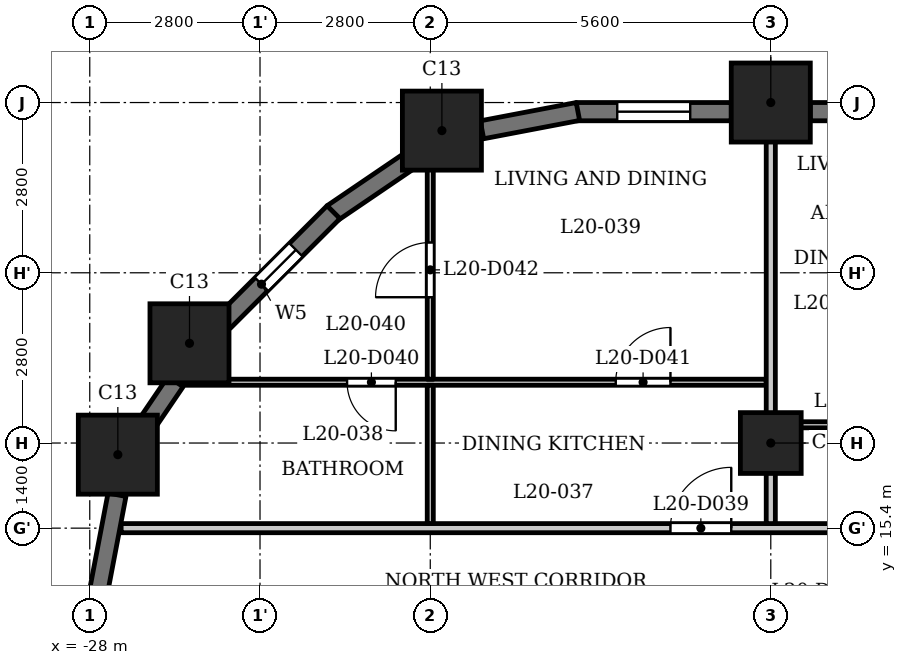
"""IFC4 building model, lengths in metres.
Left out: names, types, materials, properties, quantities, classifications, styles, units other than length and angle.
Written with IfcOpenShell. Run it as: python <this file> out.ifc"""

import sys

from ifc_helpers import new_model, si_unit, direction, frame, frame_2d, origin, origin_2d, place, context, subcontext, project, spatial, rectangle, extrude, element, fill, save


model = new_model("IFC4")
c1 = context("Model", 3, precision=1e-05, world=origin(), true_north=direction((0.0, 1.0)))
c2 = subcontext(c1, "Body", "Model", "MODEL_VIEW")
j1 = project(units=[si_unit("LENGTHUNIT", "METRE"), si_unit("PLANEANGLEUNIT", "RADIAN")], contexts=[c1])
p1 = place(None, origin())
s1 = spatial("IfcSite", under=j1, at=p1, CompositionType="ELEMENT")
p2 = place(p1, origin())
s2 = spatial("IfcBuilding", under=s1, at=p2, CompositionType="ELEMENT")
p3 = place(p2, frame((0.0, 0.0, 83.3)))
s3 = spatial("IfcBuildingStorey", under=s2, at=p3, CompositionType="ELEMENT", Elevation=83.3)
for number, where, z_axis, x_axis in (
    (1, (-16.8, 22.4, 0.0), (0.0, 0.0, 1.0), (1.0, 0.0, 0.0)),
    (2, (-22.209, 21.938, 0.0), (0.0, 0.0, 1.0), (1.0, 0.0, 0.0)),
    (3, (-26.36, 18.44, 0.0), (0.0, 0.0, 1.0), (1.0, 0.0, 0.0)),
    (4, (-27.538, 16.609, 0.0), (0.0, 0.0, 1.0), (1.0, 0.0, 0.0)),
):
    element("IfcColumn", number, at=place(p3, frame(where, z_axis=z_axis, x_axis=x_axis)), inside=s3, PredefinedType="COLUMN", context=c2, shape_type="SweptSolid", body=[
        extrude(rectangle(XDim=1.3, YDim=1.3, at=origin_2d()), origin(), (0.0, 0.0, 1.0), 3.5),
    ])
p4 = place(p3, frame((-16.8, 16.8, 0.0), z_axis=(0.0, 0.0, 1.0), x_axis=(1.0, 0.0, 0.0)))
e5 = element("IfcColumn", 5, at=p4, inside=s3, PredefinedType="COLUMN", context=c2, shape_type="SweptSolid", body=[
    extrude(rectangle(XDim=1.0, YDim=1.0, at=origin_2d()), origin(), (0.0, 0.0, 1.0), 3.5),
])
p5 = place(p3, frame((-11.85, 22.25, 0.0), z_axis=(0.0, 0.0, 1.0), x_axis=(-1.0, 0.0, 0.0)))
e6 = element("IfcWall", 6, at=p5, inside=s3, PredefinedType="SOLIDWALL", context=c2, shape_type="SweptSolid", body=[
    extrude(rectangle(XDim=4.3, YDim=0.3, at=frame_2d((2.15, 0.0))), origin(), (0.0, 0.0, 1.0), 2.4),
])
p6 = place(p5, frame((0.538, 0.0, 0.6)))
e7 = element("IfcOpeningElement", 7, at=p6, cuts=e6, PredefinedType="OPENING", context=c2, shape_type="SweptSolid", body=[
    extrude(rectangle(XDim=1.2, YDim=1.55, at=frame_2d((0.6, 0.775))), frame((0.0, 0.16, 0.0), z_axis=(0.0, -1.0, 0.0), x_axis=(1.0, 0.0, 0.0)), (0.0, 0.0, 1.0), 0.32),
])
p7 = place(p5, frame((2.762, 0.0, 0.6)))
e8 = element("IfcOpeningElement", 8, at=p7, cuts=e6, PredefinedType="OPENING", context=c2, shape_type="SweptSolid", body=[
    extrude(rectangle(XDim=1.2, YDim=1.55, at=frame_2d((0.6, 0.775))), frame((0.0, 0.16, 0.0), z_axis=(0.0, -1.0, 0.0), x_axis=(1.0, 0.0, 0.0)), (0.0, 0.0, 1.0), 0.32),
])
p8 = place(p3, frame((-17.45, 22.25, 0.0), z_axis=(0.0, 0.0, 1.0), x_axis=(-1.0, 0.0, 0.0)))
e9 = element("IfcWall", 9, at=p8, inside=s3, PredefinedType="SOLIDWALL", context=c2, shape_type="SweptSolid", body=[
    extrude(rectangle(XDim=2.55, YDim=0.3, at=frame_2d((1.275, 0.0))), origin(), (0.0, 0.0, 1.0), 2.4),
])
p9 = place(p8, frame((0.675, 0.0, 0.6)))
e10 = element("IfcOpeningElement", 10, at=p9, cuts=e9, PredefinedType="OPENING", context=c2, shape_type="SweptSolid", body=[
    extrude(rectangle(XDim=1.2, YDim=1.55, at=frame_2d((0.6, 0.775))), frame((0.0, 0.16, 0.0), z_axis=(0.0, -1.0, 0.0), x_axis=(1.0, 0.0, 0.0)), (0.0, 0.0, 1.0), 0.32),
])
for number, where, z_axis, x_axis in (
    (11, (-19.972, 22.253, 0.0), (0.0, 0.0, 1.0), (-0.982, -0.187, 0.0)),
    (12, (-22.684, 21.482, 0.0), (0.0, 0.0, 1.0), (-0.827, -0.562, 0.0)),
):
    element("IfcWall", number, at=place(p3, frame(where, z_axis=z_axis, x_axis=x_axis)), inside=s3, PredefinedType="SOLIDWALL", context=c2, shape_type="SweptSolid", body=[
        extrude(rectangle(XDim=1.606, YDim=0.3, at=frame_2d((0.803, 0.0))), origin(), (0.0, 0.0, 1.0), 2.4),
    ])
p10 = place(p3, frame((-23.991, 20.597, 0.0), z_axis=(0.0, 0.0, 1.0), x_axis=(-0.707106781187, -0.707106781187, 0.0)))
e13 = element("IfcWall", 13, at=p10, inside=s3, PredefinedType="SOLIDWALL", context=c2, shape_type="SweptSolid", body=[
    extrude(rectangle(XDim=2.55, YDim=0.3, at=frame_2d((1.275, 0.0))), origin(), (0.0, 0.0, 1.0), 2.4),
])
p11 = place(p10, frame((0.875, 0.0, 0.6)))
e14 = element("IfcOpeningElement", 14, at=p11, cuts=e13, PredefinedType="OPENING", context=c2, shape_type="SweptSolid", body=[
    extrude(rectangle(XDim=0.8, YDim=1.55, at=frame_2d((0.4, 0.775))), frame((0.0, 0.16, 0.0), z_axis=(0.0, -1.0, 0.0), x_axis=(1.0, 0.0, 0.0)), (0.0, 0.0, 1.0), 0.32),
])
p12 = place(p3, frame((-26.589, 17.81, 0.0), z_axis=(0.0, 0.0, 1.0), x_axis=(-0.562066330934, -0.827092159091, 0.0)))
e15 = element("IfcWall", 15, at=p12, inside=s3, PredefinedType="SOLIDWALL", context=c2, shape_type="SweptSolid", body=[
    extrude(rectangle(XDim=0.877, YDim=0.3, at=frame_2d((0.438, 0.0))), origin(), (0.0, 0.0, 1.0), 3.2),
])
p13 = place(p3, frame((-27.552, 15.949, 0.0), z_axis=(0.0, 0.0, 1.0), x_axis=(-0.187279751651, -0.982306619453, 0.0)))
e16 = element("IfcWall", 16, at=p13, inside=s3, PredefinedType="SOLIDWALL", context=c2, shape_type="SweptSolid", body=[
    extrude(rectangle(XDim=1.606, YDim=0.3, at=frame_2d((0.803, 0.0))), origin(), (0.0, 0.0, 1.0), 2.4),
])
p14 = place(p3, frame((-27.484, 15.4, 0.0), z_axis=(0.0, 0.0, 1.0), x_axis=(1.0, 0.0, 0.0)))
e17 = element("IfcWall", 17, at=p14, inside=s3, PredefinedType="PARTITIONING", context=c2, shape_type="SweptSolid", body=[
    extrude(rectangle(XDim=12.559, YDim=0.15, at=frame_2d((6.279, 0.0))), origin(), (0.0, 0.0, 1.0), 3.2),
])
p15 = place(p14, frame((9.034, 0.0, 0.0)))
e18 = element("IfcOpeningElement", 18, at=p15, cuts=e17, PredefinedType="OPENING", context=c2, shape_type="SweptSolid", body=[
    extrude(rectangle(XDim=1.0, YDim=2.1, at=frame_2d((0.5, 1.05))), frame((0.0, 0.085, 0.0), z_axis=(0.0, -1.0, 0.0), x_axis=(1.0, 0.0, 0.0)), (0.0, 0.0, 1.0), 0.17),
])
p16 = place(p3, frame((-16.725, 17.1, 0.0), z_axis=(0.0, 0.0, 1.0), x_axis=(1.0, 0.0, 0.0)))
e19 = element("IfcWall", 19, at=p16, inside=s3, PredefinedType="PARTITIONING", context=c2, shape_type="SweptSolid", body=[
    extrude(rectangle(XDim=33.45, YDim=0.1, at=frame_2d((16.725, 0.0))), origin(), (0.0, 0.0, 1.0), 3.2),
])
p17 = place(p16, frame((3.925, 0.0, 0.0)))
e20 = element("IfcOpeningElement", 20, at=p17, cuts=e19, PredefinedType="OPENING", context=c2, shape_type="SweptSolid", body=[
    extrude(rectangle(XDim=0.8, YDim=2.1, at=frame_2d((0.4, 1.05))), frame((0.0, 0.06, 0.0), z_axis=(0.0, -1.0, 0.0), x_axis=(1.0, 0.0, 0.0)), (0.0, 0.0, 1.0), 0.12),
])
p18 = place(p16, frame((0.975, 0.0, 0.0)))
e21 = element("IfcOpeningElement", 21, at=p18, cuts=e19, PredefinedType="OPENING", context=c2, shape_type="SweptSolid", body=[
    extrude(rectangle(XDim=0.9, YDim=2.1, at=frame_2d((0.45, 1.05))), frame((0.0, 0.06, 0.0), z_axis=(0.0, -1.0, 0.0), x_axis=(1.0, 0.0, 0.0)), (0.0, 0.0, 1.0), 0.12),
])
p19 = place(p16, frame((6.425, 0.0, 0.0)))
e22 = element("IfcOpeningElement", 22, at=p19, cuts=e19, PredefinedType="OPENING", context=c2, shape_type="SweptSolid", body=[
    extrude(rectangle(XDim=0.8, YDim=2.1, at=frame_2d((0.4, 1.05))), frame((0.0, 0.06, 0.0), z_axis=(0.0, -1.0, 0.0), x_axis=(1.0, 0.0, 0.0)), (0.0, 0.0, 1.0), 0.12),
])
p20 = place(p16, frame((8.825, 0.0, 0.0)))
e23 = element("IfcOpeningElement", 23, at=p20, cuts=e19, PredefinedType="OPENING", context=c2, shape_type="SweptSolid", body=[
    extrude(rectangle(XDim=0.9, YDim=2.1, at=frame_2d((0.45, 1.05))), frame((0.0, 0.06, 0.0), z_axis=(0.0, -1.0, 0.0), x_axis=(1.0, 0.0, 0.0)), (0.0, 0.0, 1.0), 0.12),
])
p21 = place(p16, frame((12.375, 0.0, 0.0)))
e24 = element("IfcOpeningElement", 24, at=p21, cuts=e19, PredefinedType="OPENING", context=c2, shape_type="SweptSolid", body=[
    extrude(rectangle(XDim=0.9, YDim=2.1, at=frame_2d((0.45, 1.05))), frame((0.0, 0.06, 0.0), z_axis=(0.0, -1.0, 0.0), x_axis=(1.0, 0.0, 0.0)), (0.0, 0.0, 1.0), 0.12),
])
p22 = place(p16, frame((14.425, 0.0, 0.0)))
e25 = element("IfcOpeningElement", 25, at=p22, cuts=e19, PredefinedType="OPENING", context=c2, shape_type="SweptSolid", body=[
    extrude(rectangle(XDim=0.9, YDim=2.1, at=frame_2d((0.45, 1.05))), frame((0.0, 0.06, 0.0), z_axis=(0.0, -1.0, 0.0), x_axis=(1.0, 0.0, 0.0)), (0.0, 0.0, 1.0), 0.12),
])
p23 = place(p16, frame((26.225, 0.0, 0.0)))
e26 = element("IfcOpeningElement", 26, at=p23, cuts=e19, PredefinedType="OPENING", context=c2, shape_type="SweptSolid", body=[
    extrude(rectangle(XDim=0.8, YDim=2.1, at=frame_2d((0.4, 1.05))), frame((0.0, 0.06, 0.0), z_axis=(0.0, -1.0, 0.0), x_axis=(1.0, 0.0, 0.0)), (0.0, 0.0, 1.0), 0.12),
])
p24 = place(p16, frame((23.025, 0.0, 0.0)))
e27 = element("IfcOpeningElement", 27, at=p24, cuts=e19, PredefinedType="OPENING", context=c2, shape_type="SweptSolid", body=[
    extrude(rectangle(XDim=0.9, YDim=2.1, at=frame_2d((0.45, 1.05))), frame((0.0, 0.06, 0.0), z_axis=(0.0, -1.0, 0.0), x_axis=(1.0, 0.0, 0.0)), (0.0, 0.0, 1.0), 0.12),
])
p25 = place(p16, frame((17.775, 0.0, 0.0)))
e28 = element("IfcOpeningElement", 28, at=p25, cuts=e19, PredefinedType="OPENING", context=c2, shape_type="SweptSolid", body=[
    extrude(rectangle(XDim=0.9, YDim=2.1, at=frame_2d((0.45, 1.05))), frame((0.0, 0.06, 0.0), z_axis=(0.0, -1.0, 0.0), x_axis=(1.0, 0.0, 0.0)), (0.0, 0.0, 1.0), 0.12),
])
p26 = place(p16, frame((20.025, 0.0, 0.0)))
e29 = element("IfcOpeningElement", 29, at=p26, cuts=e19, PredefinedType="OPENING", context=c2, shape_type="SweptSolid", body=[
    extrude(rectangle(XDim=0.9, YDim=2.1, at=frame_2d((0.45, 1.05))), frame((0.0, 0.06, 0.0), z_axis=(0.0, -1.0, 0.0), x_axis=(1.0, 0.0, 0.0)), (0.0, 0.0, 1.0), 0.12),
])
p27 = place(p16, frame((28.825, 0.0, 0.0)))
e30 = element("IfcOpeningElement", 30, at=p27, cuts=e19, PredefinedType="OPENING", context=c2, shape_type="SweptSolid", body=[
    extrude(rectangle(XDim=0.8, YDim=2.1, at=frame_2d((0.4, 1.05))), frame((0.0, 0.06, 0.0), z_axis=(0.0, -1.0, 0.0), x_axis=(1.0, 0.0, 0.0)), (0.0, 0.0, 1.0), 0.12),
])
p28 = place(p16, frame((31.975, 0.0, 0.0)))
e31 = element("IfcOpeningElement", 31, at=p28, cuts=e19, PredefinedType="OPENING", context=c2, shape_type="SweptSolid", body=[
    extrude(rectangle(XDim=0.9, YDim=2.1, at=frame_2d((0.45, 1.05))), frame((0.0, 0.06, 0.0), z_axis=(0.0, -1.0, 0.0), x_axis=(1.0, 0.0, 0.0)), (0.0, 0.0, 1.0), 0.12),
])
p29 = place(p3, frame((-26.554, 17.8, 0.0), z_axis=(0.0, 0.0, 1.0), x_axis=(1.0, 0.0, 0.0)))
e32 = element("IfcWall", 32, at=p29, inside=s3, PredefinedType="PARTITIONING", context=c2, shape_type="SweptSolid", body=[
    extrude(rectangle(XDim=9.679, YDim=0.1, at=frame_2d((4.84, 0.0))), origin(), (0.0, 0.0, 1.0), 3.2),
])
p30 = place(p29, frame((2.786, 0.0, 0.0)))
e33 = element("IfcOpeningElement", 33, at=p30, cuts=e32, PredefinedType="OPENING", context=c2, shape_type="SweptSolid", body=[
    extrude(rectangle(XDim=0.8, YDim=2.1, at=frame_2d((0.4, 1.05))), frame((0.0, 0.06, 0.0), z_axis=(0.0, -1.0, 0.0), x_axis=(1.0, 0.0, 0.0)), (0.0, 0.0, 1.0), 0.12),
])
p31 = place(p29, frame((7.204, 0.0, 0.0)))
e34 = element("IfcOpeningElement", 34, at=p31, cuts=e32, PredefinedType="OPENING", context=c2, shape_type="SweptSolid", body=[
    extrude(rectangle(XDim=0.9, YDim=2.1, at=frame_2d((0.45, 1.05))), frame((0.0, 0.06, 0.0), z_axis=(0.0, -1.0, 0.0), x_axis=(1.0, 0.0, 0.0)), (0.0, 0.0, 1.0), 0.12),
])
p32 = place(p3, frame((-22.4, 15.475, 0.0), z_axis=(0.0, 0.0, 1.0), x_axis=(0.0, 1.0, 0.0)))
e35 = element("IfcWall", 35, at=p32, inside=s3, PredefinedType="PARTITIONING", context=c2, shape_type="SweptSolid", body=[
    extrude(rectangle(XDim=2.275, YDim=0.1, at=frame_2d((1.137, 0.0))), origin(), (0.0, 0.0, 1.0), 3.2),
])
p33 = place(p3, frame((-22.4, 17.85, 0.0), z_axis=(0.0, 0.0, 1.0), x_axis=(0.0, 1.0, 0.0)))
e36 = element("IfcWall", 36, at=p33, inside=s3, PredefinedType="PARTITIONING", context=c2, shape_type="SweptSolid", body=[
    extrude(rectangle(XDim=3.87, YDim=0.1, at=frame_2d((1.935, 0.0))), origin(), (0.0, 0.0, 1.0), 3.2),
])
p34 = place(p33, frame((1.348, 0.0, 0.0)))
e37 = element("IfcOpeningElement", 37, at=p34, cuts=e36, PredefinedType="OPENING", context=c2, shape_type="SweptSolid", body=[
    extrude(rectangle(XDim=0.9, YDim=2.1, at=frame_2d((0.45, 1.05))), frame((0.0, 0.06, 0.0), z_axis=(0.0, -1.0, 0.0), x_axis=(1.0, 0.0, 0.0)), (0.0, 0.0, 1.0), 0.12),
])
p35 = place(p3, frame((-16.8, 15.475, 0.0), z_axis=(0.0, 0.0, 1.0), x_axis=(0.0, 1.0, 0.0)))
e38 = element("IfcWall", 38, at=p35, inside=s3, PredefinedType="PARTITIONING", context=c2, shape_type="SweptSolid", body=[
    extrude(rectangle(XDim=7.555, YDim=0.15, at=frame_2d((3.777, 0.0))), origin(), (0.0, 0.0, 1.0), 3.2),
])
p36 = place(p15, origin())
e39 = element("IfcDoor", 39, at=p36, inside=s3, OperationType="SINGLE_SWING_LEFT", PredefinedType="DOOR", context=c2, shape_type="SweptSolid", body=[
    extrude(rectangle(XDim=1.0, YDim=2.1, at=frame_2d((0.5, 1.05))), frame((0.0, 0.025, 0.0), z_axis=(0.0, -1.0, 0.0), x_axis=(1.0, 0.0, 0.0)), (0.0, 0.0, 1.0), 0.05),
])
fill(e18, e39)
p37 = place(p30, origin())
e40 = element("IfcDoor", 40, at=p37, inside=s3, OperationType="SINGLE_SWING_RIGHT", PredefinedType="DOOR", context=c2, shape_type="SweptSolid", body=[
    extrude(rectangle(XDim=0.8, YDim=2.1, at=frame_2d((0.4, 1.05))), frame((0.0, 0.025, 0.0), z_axis=(0.0, -1.0, 0.0), x_axis=(1.0, 0.0, 0.0)), (0.0, 0.0, 1.0), 0.05),
])
fill(e33, e40)
p38 = place(p31, origin())
e41 = element("IfcDoor", 41, at=p38, inside=s3, OperationType="SINGLE_SWING_LEFT", PredefinedType="DOOR", context=c2, shape_type="SweptSolid", body=[
    extrude(rectangle(XDim=0.9, YDim=2.1, at=frame_2d((0.45, 1.05))), frame((0.0, 0.025, 0.0), z_axis=(0.0, -1.0, 0.0), x_axis=(1.0, 0.0, 0.0)), (0.0, 0.0, 1.0), 0.05),
])
fill(e34, e41)
p39 = place(p34, origin())
e42 = element("IfcDoor", 42, at=p39, inside=s3, OperationType="SINGLE_SWING_RIGHT", PredefinedType="DOOR", context=c2, shape_type="SweptSolid", body=[
    extrude(rectangle(XDim=0.9, YDim=2.1, at=frame_2d((0.45, 1.05))), frame((0.0, 0.025, 0.0), z_axis=(0.0, -1.0, 0.0), x_axis=(1.0, 0.0, 0.0)), (0.0, 0.0, 1.0), 0.05),
])
fill(e37, e42)
p40 = place(p9, origin())
e43 = element("IfcWindow", 43, at=p40, inside=s3, PartitioningType="SINGLE_PANEL", PredefinedType="WINDOW", context=c2, shape_type="SweptSolid", body=[
    extrude(rectangle(XDim=1.2, YDim=1.55, at=frame_2d((0.6, 0.775))), frame((0.0, 0.03, 0.0), z_axis=(0.0, -1.0, 0.0), x_axis=(1.0, 0.0, 0.0)), (0.0, 0.0, 1.0), 0.06),
])
fill(e10, e43)
p41 = place(p11, origin())
e44 = element("IfcWindow", 44, at=p41, inside=s3, PartitioningType="SINGLE_PANEL", PredefinedType="WINDOW", context=c2, shape_type="SweptSolid", body=[
    extrude(rectangle(XDim=0.8, YDim=1.55, at=frame_2d((0.4, 0.775))), frame((0.0, 0.03, 0.0), z_axis=(0.0, -1.0, 0.0), x_axis=(1.0, 0.0, 0.0)), (0.0, 0.0, 1.0), 0.06),
])
fill(e14, e44)
save(model, sys.argv[1])
